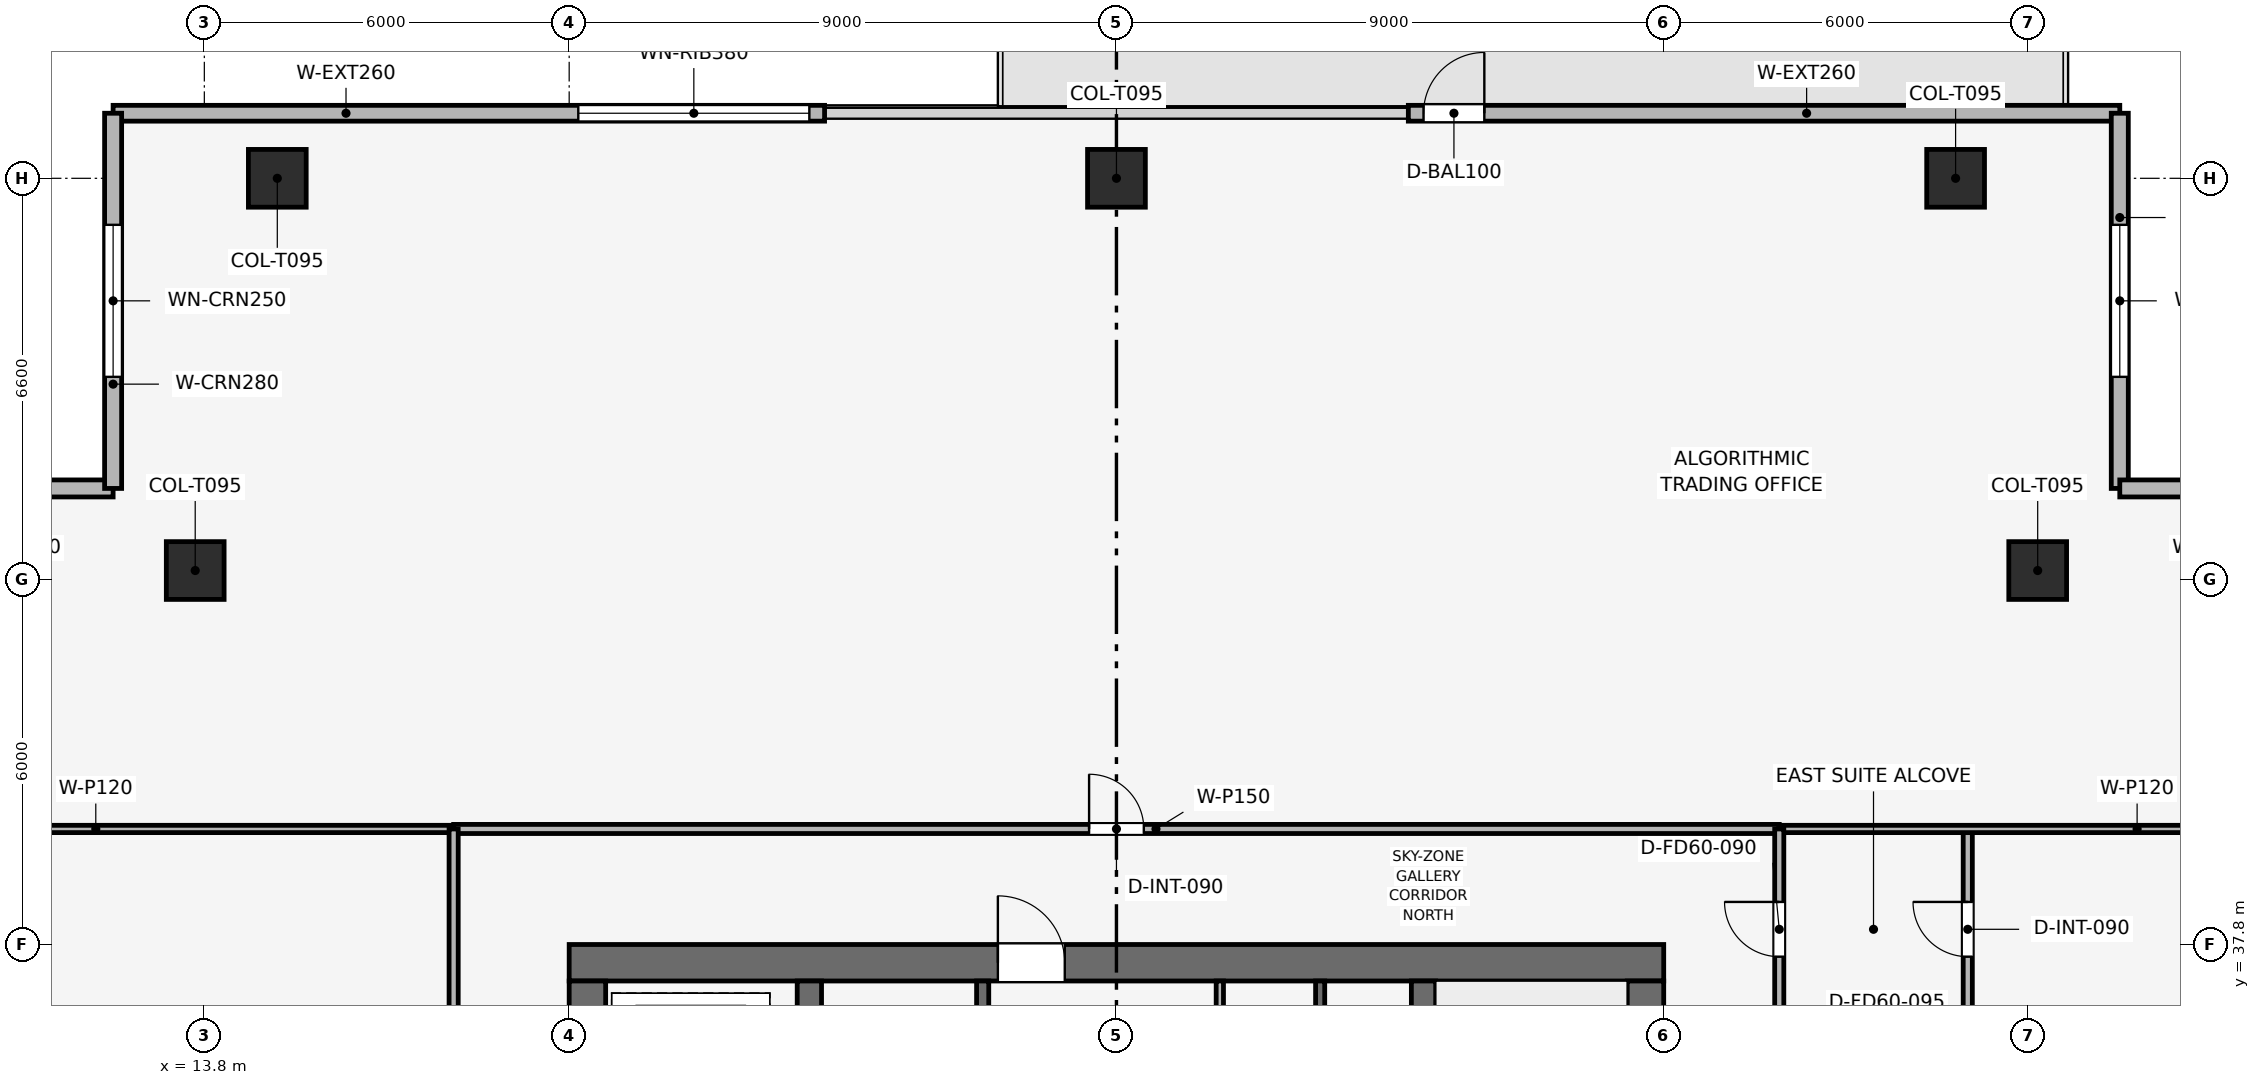
"""IFC4 building model, lengths in metres.
Left out: names, types, materials, properties, quantities, classifications, styles, units other than length and angle.
Written with IfcOpenShell. Run it as: python <this file> out.ifc"""

import sys

from ifc_helpers import new_model, si_unit, direction, frame, frame_2d, origin, origin_2d, place, context, subcontext, project, spatial, rectangle, extrude, element, fill, save


model = new_model("IFC4")
c1 = context("Model", 3, precision=1e-05, world=origin(), true_north=direction((0.0, 1.0)))
c2 = subcontext(c1, "Body", "Model", "MODEL_VIEW")
j1 = project(units=[si_unit("LENGTHUNIT", "METRE"), si_unit("PLANEANGLEUNIT", "RADIAN")], contexts=[c1])
p1 = place(None, origin())
s1 = spatial("IfcSite", under=j1, at=p1, CompositionType="ELEMENT")
p2 = place(p1, origin())
s2 = spatial("IfcBuilding", under=s1, at=p2, CompositionType="ELEMENT")
p3 = place(p2, frame((0.0, 0.0, 325.5)))
s3 = spatial("IfcBuildingStorey", under=s2, at=p3, CompositionType="ELEMENT", Elevation=325.5)
p4 = place(p3, frame((19.8, 37.5, 0.0), z_axis=(0.0, 0.0, 1.0), x_axis=(1.0, 0.0, 0.0)))
e1 = element("IfcWall", 1, at=p4, inside=s3, PredefinedType="SHEAR", context=c2, shape_type="SweptSolid", body=[
    extrude(rectangle(XDim=18.0, YDim=0.6, at=frame_2d((9.0, 0.0))), origin(), (0.0, 0.0, 1.0), 3.75),
])
p5 = place(p4, frame((7.05, 0.0, 0.0)))
e2 = element("IfcOpeningElement", 2, at=p5, cuts=e1, PredefinedType="OPENING", context=c2, shape_type="SweptSolid", body=[
    extrude(rectangle(XDim=1.1, YDim=2.15, at=frame_2d((0.55, 1.075))), frame((0.0, 0.31, 0.0), z_axis=(0.0, -1.0, 0.0), x_axis=(1.0, 0.0, 0.0)), (0.0, 0.0, 1.0), 0.62),
])
p6 = place(p3, frame((20.1, 20.4, 0.0), z_axis=(0.0, 0.0, 1.0), x_axis=(0.0, 1.0, 0.0)))
e3 = element("IfcWall", 3, at=p6, inside=s3, PredefinedType="SHEAR", context=c2, shape_type="SweptSolid", body=[
    extrude(rectangle(XDim=16.8, YDim=0.6, at=frame_2d((8.4, 0.0))), origin(), (0.0, 0.0, 1.0), 3.75),
])
p7 = place(p6, frame((10.4, 0.0, 0.0)))
e4 = element("IfcOpeningElement", 4, at=p7, cuts=e3, PredefinedType="OPENING", context=c2, shape_type="SweptSolid", body=[
    extrude(rectangle(XDim=1.1, YDim=2.15, at=frame_2d((0.55, 1.075))), frame((0.0, 0.31, 0.0), z_axis=(0.0, -1.0, 0.0), x_axis=(1.0, 0.0, 0.0)), (0.0, 0.0, 1.0), 0.62),
])
p8 = place(p3, frame((37.5, 20.4, 0.0), z_axis=(0.0, 0.0, 1.0), x_axis=(0.0, 1.0, 0.0)))
e5 = element("IfcWall", 5, at=p8, inside=s3, PredefinedType="SHEAR", context=c2, shape_type="SweptSolid", body=[
    extrude(rectangle(XDim=16.8, YDim=0.6, at=frame_2d((8.4, 0.0))), origin(), (0.0, 0.0, 1.0), 3.75),
])
p9 = place(p8, frame((4.9, 0.0, 0.0)))
e6 = element("IfcOpeningElement", 6, at=p9, cuts=e5, PredefinedType="OPENING", context=c2, shape_type="SweptSolid", body=[
    extrude(rectangle(XDim=1.1, YDim=2.15, at=frame_2d((0.55, 1.075))), frame((0.0, 0.31, 0.0), z_axis=(0.0, -1.0, 0.0), x_axis=(1.0, 0.0, 0.0)), (0.0, 0.0, 1.0), 0.62),
])
for number, where, z_axis, x_axis in (
    (7, (23.75, 20.4, 0.0), (0.0, 0.0, 1.0), (0.0, 1.0, 0.0)),
    (8, (33.85, 20.4, 0.0), (0.0, 0.0, 1.0), (0.0, 1.0, 0.0)),
):
    element("IfcWall", number, at=place(p3, frame(where, z_axis=z_axis, x_axis=x_axis)), inside=s3, PredefinedType="SHEAR", context=c2, shape_type="SweptSolid", body=[
        extrude(rectangle(XDim=16.8, YDim=0.4, at=frame_2d((8.4, 0.0))), origin(), (0.0, 0.0, 1.0), 3.75),
    ])
for number, where, z_axis, x_axis in (
    (9, (42.6, 50.4, 0.003), (0.0, 0.0, 1.0), (1.0, 0.0, 0.0)),
    (10, (28.8, 50.4, 0.003), (0.0, 0.0, 1.0), (1.0, 0.0, 0.0)),
    (11, (15.0, 50.4, 0.003), (0.0, 0.0, 1.0), (1.0, 0.0, 0.0)),
    (12, (43.95, 43.95, 0.003), (0.0, 0.0, 1.0), (1.0, 0.0, 0.0)),
    (13, (13.65, 43.95, 0.003), (0.0, 0.0, 1.0), (1.0, 0.0, 0.0)),
):
    element("IfcColumn", number, at=place(p3, frame(where, z_axis=z_axis, x_axis=x_axis)), inside=s3, PredefinedType="COLUMN", context=c2, shape_type="SweptSolid", body=[
        extrude(rectangle(XDim=0.95, YDim=0.95, at=origin_2d()), origin(), (0.0, 0.0, 1.0), 3.504),
    ])
p10 = place(p3, frame((12.3, 51.47, 0.0), z_axis=(0.0, 0.0, 1.0), x_axis=(1.0, 0.0, 0.0)))
e14 = element("IfcWall", 14, at=p10, inside=s3, PredefinedType="SOLIDWALL", context=c2, shape_type="SweptSolid", body=[
    extrude(rectangle(XDim=11.7, YDim=0.26, at=frame_2d((5.85, 0.0))), origin(), (0.0, 0.0, 1.0), 3.51),
])
p11 = place(p10, frame((7.65, 0.0, 0.9)))
e15 = element("IfcOpeningElement", 15, at=p11, cuts=e14, PredefinedType="OPENING", context=c2, shape_type="SweptSolid", body=[
    extrude(rectangle(XDim=3.8, YDim=1.9, at=frame_2d((1.9, 0.95))), frame((0.0, 0.14, 0.0), z_axis=(0.0, -1.0, 0.0), x_axis=(1.0, 0.0, 0.0)), (0.0, 0.0, 1.0), 0.28),
])
p12 = place(p3, frame((33.6, 51.47, 0.0), z_axis=(0.0, 0.0, 1.0), x_axis=(1.0, 0.0, 0.0)))
e16 = element("IfcWall", 16, at=p12, inside=s3, PredefinedType="SOLIDWALL", context=c2, shape_type="SweptSolid", body=[
    extrude(rectangle(XDim=11.7, YDim=0.26, at=frame_2d((5.85, 0.0))), origin(), (0.0, 0.0, 1.0), 3.51),
])
p13 = place(p12, frame((0.25, 0.0, 0.0)))
e17 = element("IfcOpeningElement", 17, at=p13, cuts=e16, PredefinedType="OPENING", context=c2, shape_type="SweptSolid", body=[
    extrude(rectangle(XDim=1.0, YDim=2.2, at=frame_2d((0.5, 1.1))), frame((0.0, 0.14, 0.0), z_axis=(0.0, -1.0, 0.0), x_axis=(1.0, 0.0, 0.0)), (0.0, 0.0, 1.0), 0.28),
])
p14 = place(p3, frame((6.13, 45.3, 0.0), z_axis=(0.0, 0.0, 1.0), x_axis=(1.0, 0.0, 0.0)))
e18 = element("IfcWall", 18, at=p14, inside=s3, PredefinedType="SOLIDWALL", context=c2, shape_type="SweptSolid", body=[
    extrude(rectangle(XDim=6.17, YDim=0.28, at=frame_2d((3.085, 0.0))), origin(), (0.0, 0.0, 1.0), 3.51),
])
p15 = place(p14, frame((1.835, 0.0, 0.9)))
e19 = element("IfcOpeningElement", 19, at=p15, cuts=e18, PredefinedType="OPENING", context=c2, shape_type="SweptSolid", body=[
    extrude(rectangle(XDim=2.5, YDim=1.9, at=frame_2d((1.25, 0.95))), frame((0.0, 0.15, 0.0), z_axis=(0.0, -1.0, 0.0), x_axis=(1.0, 0.0, 0.0)), (0.0, 0.0, 1.0), 0.3),
])
p16 = place(p3, frame((12.3, 45.3, 0.0), z_axis=(0.0, 0.0, 1.0), x_axis=(0.0, 1.0, 0.0)))
e20 = element("IfcWall", 20, at=p16, inside=s3, PredefinedType="SOLIDWALL", context=c2, shape_type="SweptSolid", body=[
    extrude(rectangle(XDim=6.17, YDim=0.28, at=frame_2d((3.085, 0.0))), origin(), (0.0, 0.0, 1.0), 3.51),
])
p17 = place(p16, frame((1.835, 0.0, 0.9)))
e21 = element("IfcOpeningElement", 21, at=p17, cuts=e20, PredefinedType="OPENING", context=c2, shape_type="SweptSolid", body=[
    extrude(rectangle(XDim=2.5, YDim=1.9, at=frame_2d((1.25, 0.95))), frame((0.0, 0.15, 0.0), z_axis=(0.0, -1.0, 0.0), x_axis=(1.0, 0.0, 0.0)), (0.0, 0.0, 1.0), 0.3),
])
p18 = place(p3, frame((45.3, 51.47, 0.0), z_axis=(0.0, 0.0, 1.0), x_axis=(0.0, -1.0, 0.0)))
e22 = element("IfcWall", 22, at=p18, inside=s3, PredefinedType="SOLIDWALL", context=c2, shape_type="SweptSolid", body=[
    extrude(rectangle(XDim=6.17, YDim=0.28, at=frame_2d((3.085, 0.0))), origin(), (0.0, 0.0, 1.0), 3.51),
])
p19 = place(p18, frame((1.835, 0.0, 0.9)))
e23 = element("IfcOpeningElement", 23, at=p19, cuts=e22, PredefinedType="OPENING", context=c2, shape_type="SweptSolid", body=[
    extrude(rectangle(XDim=2.5, YDim=1.9, at=frame_2d((1.25, 0.95))), frame((0.0, 0.15, 0.0), z_axis=(0.0, -1.0, 0.0), x_axis=(1.0, 0.0, 0.0)), (0.0, 0.0, 1.0), 0.3),
])
p20 = place(p3, frame((45.3, 45.3, 0.0), z_axis=(0.0, 0.0, 1.0), x_axis=(1.0, 0.0, 0.0)))
e24 = element("IfcWall", 24, at=p20, inside=s3, PredefinedType="SOLIDWALL", context=c2, shape_type="SweptSolid", body=[
    extrude(rectangle(XDim=6.17, YDim=0.28, at=frame_2d((3.085, 0.0))), origin(), (0.0, 0.0, 1.0), 3.51),
])
p21 = place(p20, frame((1.835, 0.0, 0.9)))
e25 = element("IfcOpeningElement", 25, at=p21, cuts=e24, PredefinedType="OPENING", context=c2, shape_type="SweptSolid", body=[
    extrude(rectangle(XDim=2.5, YDim=1.9, at=frame_2d((1.25, 0.95))), frame((0.0, 0.15, 0.0), z_axis=(0.0, -1.0, 0.0), x_axis=(1.0, 0.0, 0.0)), (0.0, 0.0, 1.0), 0.3),
])
p22 = place(p3, frame((32.15, 34.0, 0.0), z_axis=(0.0, 0.0, 1.0), x_axis=(0.0, 1.0, 0.0)))
e26 = element("IfcWall", 26, at=p22, inside=s3, PredefinedType="SHEAR", context=c2, shape_type="SweptSolid", body=[
    extrude(rectangle(XDim=3.2, YDim=0.15, at=frame_2d((1.6, 0.0))), origin(), (0.0, 0.0, 1.0), 3.51),
])
p23 = place(p3, frame((26.6, 34.0, 0.0), z_axis=(0.0, 0.0, 1.0), x_axis=(0.0, 1.0, 0.0)))
e27 = element("IfcWall", 27, at=p23, inside=s3, PredefinedType="SHEAR", context=c2, shape_type="SweptSolid", body=[
    extrude(rectangle(XDim=3.2, YDim=0.2, at=frame_2d((1.6, 0.0))), origin(), (0.0, 0.0, 1.0), 3.51),
])
p24 = place(p23, frame((0.75, 0.0, 0.0)))
e28 = element("IfcOpeningElement", 28, at=p24, cuts=e27, PredefinedType="OPENING", context=c2, shape_type="SweptSolid", body=[
    extrude(rectangle(XDim=1.1, YDim=2.15, at=frame_2d((0.55, 1.075))), frame((0.0, 0.11, 0.0), z_axis=(0.0, -1.0, 0.0), x_axis=(1.0, 0.0, 0.0)), (0.0, 0.0, 1.0), 0.22),
])
p25 = place(p3, frame((30.5, 33.925, 0.0), z_axis=(0.0, 0.0, 1.0), x_axis=(0.0, 1.0, 0.0)))
e29 = element("IfcWall", 29, at=p25, inside=s3, PredefinedType="PARTITIONING", context=c2, shape_type="SweptSolid", body=[
    extrude(rectangle(XDim=3.275, YDim=0.12, at=frame_2d((1.637, 0.0))), origin(), (0.0, 0.0, 1.0), 3.51),
])
p26 = place(p25, frame((0.85, 0.0, 0.0)))
e30 = element("IfcOpeningElement", 30, at=p26, cuts=e29, PredefinedType="OPENING", context=c2, shape_type="SweptSolid", body=[
    extrude(rectangle(XDim=0.9, YDim=2.1, at=frame_2d((0.45, 1.05))), frame((0.0, 0.07, 0.0), z_axis=(0.0, -1.0, 0.0), x_axis=(1.0, 0.0, 0.0)), (0.0, 0.0, 1.0), 0.14),
])
p27 = place(p3, frame((42.8, 28.0, 0.0), z_axis=(0.0, 0.0, 1.0), x_axis=(0.0, 1.0, 0.0)))
e31 = element("IfcWall", 31, at=p27, inside=s3, PredefinedType="PARTITIONING", context=c2, shape_type="SweptSolid", body=[
    extrude(rectangle(XDim=11.7, YDim=0.15, at=frame_2d((5.85, 0.0))), origin(), (0.0, 0.0, 1.0), 3.095),
])
p28 = place(p27, frame((9.6, 0.0, 0.0)))
e32 = element("IfcOpeningElement", 32, at=p28, cuts=e31, PredefinedType="OPENING", context=c2, shape_type="SweptSolid", body=[
    extrude(rectangle(XDim=0.9, YDim=2.1, at=frame_2d((0.45, 1.05))), frame((0.0, 0.085, 0.0), z_axis=(0.0, -1.0, 0.0), x_axis=(1.0, 0.0, 0.0)), (0.0, 0.0, 1.0), 0.17),
])
for number, where, z_axis, x_axis in (
    (33, (6.13, 39.7, 0.0), (0.0, 0.0, 1.0), (1.0, 0.0, 0.0)),
    (34, (39.7, 39.7, 0.0), (0.0, 0.0, 1.0), (1.0, 0.0, 0.0)),
):
    element("IfcWall", number, at=place(p3, frame(where, z_axis=z_axis, x_axis=x_axis)), inside=s3, PredefinedType="PARTITIONING", context=c2, shape_type="SweptSolid", body=[
        extrude(rectangle(XDim=11.77, YDim=0.12, at=frame_2d((5.885, 0.0))), origin(), (0.0, 0.0, 1.0), 3.095),
    ])
p29 = place(p3, frame((17.9, 39.7, 0.0), z_axis=(0.0, 0.0, 1.0), x_axis=(1.0, 0.0, 0.0)))
e35 = element("IfcWall", 35, at=p29, inside=s3, PredefinedType="PARTITIONING", context=c2, shape_type="SweptSolid", body=[
    extrude(rectangle(XDim=21.8, YDim=0.15, at=frame_2d((10.9, 0.0))), origin(), (0.0, 0.0, 1.0), 3.095),
])
p30 = place(p29, frame((10.45, 0.0, 0.0)))
e36 = element("IfcOpeningElement", 36, at=p30, cuts=e35, PredefinedType="OPENING", context=c2, shape_type="SweptSolid", body=[
    extrude(rectangle(XDim=0.9, YDim=2.1, at=frame_2d((0.45, 1.05))), frame((0.0, 0.085, 0.0), z_axis=(0.0, -1.0, 0.0), x_axis=(1.0, 0.0, 0.0)), (0.0, 0.0, 1.0), 0.17),
])
p31 = place(p3, frame((17.9, 12.3, 0.0), z_axis=(0.0, 0.0, 1.0), x_axis=(0.0, 1.0, 0.0)))
e37 = element("IfcWall", 37, at=p31, inside=s3, PredefinedType="PARTITIONING", context=c2, shape_type="SweptSolid", body=[
    extrude(rectangle(XDim=27.4, YDim=0.15, at=frame_2d((13.7, 0.0))), origin(), (0.0, 0.0, 1.0), 3.095),
])
p32 = place(p31, frame((1.498, 0.0, 0.0)))
e38 = element("IfcOpeningElement", 38, at=p32, cuts=e37, PredefinedType="OPENING", context=c2, shape_type="SweptSolid", body=[
    extrude(rectangle(XDim=0.9, YDim=2.1, at=frame_2d((0.45, 1.05))), frame((0.0, 0.085, 0.0), z_axis=(0.0, -1.0, 0.0), x_axis=(1.0, 0.0, 0.0)), (0.0, 0.0, 1.0), 0.17),
])
p33 = place(p31, frame((15.198, 0.0, 0.0)))
e39 = element("IfcOpeningElement", 39, at=p33, cuts=e37, PredefinedType="OPENING", context=c2, shape_type="SweptSolid", body=[
    extrude(rectangle(XDim=0.9, YDim=2.1, at=frame_2d((0.45, 1.05))), frame((0.0, 0.085, 0.0), z_axis=(0.0, -1.0, 0.0), x_axis=(1.0, 0.0, 0.0)), (0.0, 0.0, 1.0), 0.17),
])
p34 = place(p3, frame((39.7, 24.4, 0.0), z_axis=(0.0, 0.0, 1.0), x_axis=(0.0, 1.0, 0.0)))
e40 = element("IfcWall", 40, at=p34, inside=s3, PredefinedType="PARTITIONING", context=c2, shape_type="SweptSolid", body=[
    extrude(rectangle(XDim=15.3, YDim=0.15, at=frame_2d((7.65, 0.0))), origin(), (0.0, 0.0, 1.0), 3.095),
])
p35 = place(p34, frame((1.35, 0.0, 0.0)))
e41 = element("IfcOpeningElement", 41, at=p35, cuts=e40, PredefinedType="OPENING", context=c2, shape_type="SweptSolid", body=[
    extrude(rectangle(XDim=0.9, YDim=2.1, at=frame_2d((0.45, 1.05))), frame((0.0, 0.085, 0.0), z_axis=(0.0, -1.0, 0.0), x_axis=(1.0, 0.0, 0.0)), (0.0, 0.0, 1.0), 0.17),
])
p36 = place(p34, frame((4.55, 0.0, 0.0)))
e42 = element("IfcOpeningElement", 42, at=p36, cuts=e40, PredefinedType="OPENING", context=c2, shape_type="SweptSolid", body=[
    extrude(rectangle(XDim=0.9, YDim=2.1, at=frame_2d((0.45, 1.05))), frame((0.0, 0.085, 0.0), z_axis=(0.0, -1.0, 0.0), x_axis=(1.0, 0.0, 0.0)), (0.0, 0.0, 1.0), 0.17),
])
p37 = place(p34, frame((7.45, 0.0, 0.0)))
e43 = element("IfcOpeningElement", 43, at=p37, cuts=e40, PredefinedType="OPENING", context=c2, shape_type="SweptSolid", body=[
    extrude(rectangle(XDim=0.9, YDim=2.1, at=frame_2d((0.45, 1.05))), frame((0.0, 0.085, 0.0), z_axis=(0.0, -1.0, 0.0), x_axis=(1.0, 0.0, 0.0)), (0.0, 0.0, 1.0), 0.17),
])
p38 = place(p34, frame((10.2, 0.0, 0.0)))
e44 = element("IfcOpeningElement", 44, at=p38, cuts=e40, PredefinedType="OPENING", context=c2, shape_type="SweptSolid", body=[
    extrude(rectangle(XDim=0.95, YDim=2.1, at=frame_2d((0.475, 1.05))), frame((0.0, 0.085, 0.0), z_axis=(0.0, -1.0, 0.0), x_axis=(1.0, 0.0, 0.0)), (0.0, 0.0, 1.0), 0.17),
])
p39 = place(p34, frame((13.2, 0.0, 0.0)))
e45 = element("IfcOpeningElement", 45, at=p39, cuts=e40, PredefinedType="OPENING", context=c2, shape_type="SweptSolid", body=[
    extrude(rectangle(XDim=0.9, YDim=2.1, at=frame_2d((0.45, 1.05))), frame((0.0, 0.085, 0.0), z_axis=(0.0, -1.0, 0.0), x_axis=(1.0, 0.0, 0.0)), (0.0, 0.0, 1.0), 0.17),
])
p40 = place(p13, origin())
e46 = element("IfcDoor", 46, at=p40, inside=s3, OperationType="SINGLE_SWING_RIGHT", PredefinedType="DOOR", context=c2, shape_type="SweptSolid", body=[
    extrude(rectangle(XDim=1.0, YDim=2.2, at=frame_2d((0.5, 1.1))), frame((0.0, 0.025, 0.0), z_axis=(0.0, -1.0, 0.0), x_axis=(1.0, 0.0, 0.0)), (0.0, 0.0, 1.0), 0.05),
])
fill(e17, e46)
p41 = place(p11, origin())
e47 = element("IfcWindow", 47, at=p41, inside=s3, PartitioningType="SINGLE_PANEL", PredefinedType="WINDOW", context=c2, shape_type="SweptSolid", body=[
    extrude(rectangle(XDim=3.8, YDim=1.9, at=frame_2d((1.9, 0.95))), frame((0.0, 0.03, 0.0), z_axis=(0.0, -1.0, 0.0), x_axis=(1.0, 0.0, 0.0)), (0.0, 0.0, 1.0), 0.06),
])
fill(e15, e47)
p42 = place(p17, origin())
e48 = element("IfcWindow", 48, at=p42, inside=s3, PartitioningType="SINGLE_PANEL", PredefinedType="WINDOW", context=c2, shape_type="SweptSolid", body=[
    extrude(rectangle(XDim=2.5, YDim=1.9, at=frame_2d((1.25, 0.95))), frame((0.0, 0.03, 0.0), z_axis=(0.0, -1.0, 0.0), x_axis=(1.0, 0.0, 0.0)), (0.0, 0.0, 1.0), 0.06),
])
fill(e21, e48)
p43 = place(p19, origin())
e49 = element("IfcWindow", 49, at=p43, inside=s3, PartitioningType="SINGLE_PANEL", PredefinedType="WINDOW", context=c2, shape_type="SweptSolid", body=[
    extrude(rectangle(XDim=2.5, YDim=1.9, at=frame_2d((1.25, 0.95))), frame((0.0, 0.03, 0.0), z_axis=(0.0, -1.0, 0.0), x_axis=(1.0, 0.0, 0.0)), (0.0, 0.0, 1.0), 0.06),
])
fill(e23, e49)
p44 = place(p28, origin())
e50 = element("IfcDoor", 50, at=p44, inside=s3, OperationType="SINGLE_SWING_RIGHT", PredefinedType="DOOR", context=c2, shape_type="SweptSolid", body=[
    extrude(rectangle(XDim=0.9, YDim=2.1, at=frame_2d((0.45, 1.05))), frame((0.0, 0.025, 0.0), z_axis=(0.0, -1.0, 0.0), x_axis=(1.0, 0.0, 0.0)), (0.0, 0.0, 1.0), 0.05),
])
fill(e32, e50)
p45 = place(p30, origin())
e51 = element("IfcDoor", 51, at=p45, inside=s3, OperationType="SINGLE_SWING_LEFT", PredefinedType="DOOR", context=c2, shape_type="SweptSolid", body=[
    extrude(rectangle(XDim=0.9, YDim=2.1, at=frame_2d((0.45, 1.05))), frame((0.0, 0.025, 0.0), z_axis=(0.0, -1.0, 0.0), x_axis=(1.0, 0.0, 0.0)), (0.0, 0.0, 1.0), 0.05),
])
fill(e36, e51)
p46 = place(p39, origin())
e52 = element("IfcDoor", 52, at=p46, inside=s3, OperationType="SINGLE_SWING_RIGHT", PredefinedType="DOOR", context=c2, shape_type="SweptSolid", body=[
    extrude(rectangle(XDim=0.9, YDim=2.1, at=frame_2d((0.45, 1.05))), frame((0.0, 0.025, 0.0), z_axis=(0.0, -1.0, 0.0), x_axis=(1.0, 0.0, 0.0)), (0.0, 0.0, 1.0), 0.05),
])
fill(e45, e52)
p47 = place(p5, origin())
e53 = element("IfcDoor", 53, at=p47, inside=s3, OperationType="SINGLE_SWING_LEFT", PredefinedType="DOOR", context=c2, shape_type="SweptSolid", body=[
    extrude(rectangle(XDim=1.1, YDim=2.15, at=frame_2d((0.55, 1.075))), frame((0.0, 0.025, 0.0), z_axis=(0.0, -1.0, 0.0), x_axis=(1.0, 0.0, 0.0)), (0.0, 0.0, 1.0), 0.05),
])
fill(e2, e53)
save(model, sys.argv[1])
